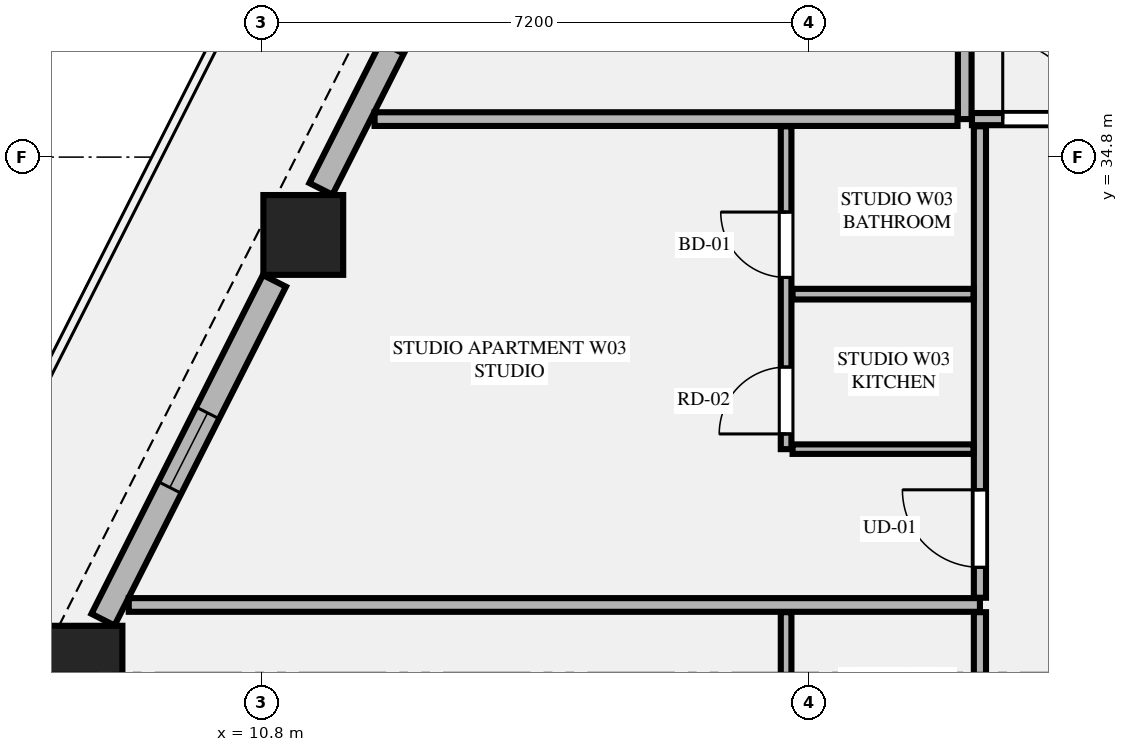
"""IFC4 building model, lengths in metres.
Left out: names, types, materials, properties, quantities, classifications, styles, units other than length and angle.
Written with IfcOpenShell. Run it as: python <this file> out.ifc"""

import sys

from ifc_helpers import new_model, si_unit, direction, frame, frame_2d, origin, origin_2d, place, context, subcontext, project, spatial, rectangle, extrude, element, fill, save


model = new_model("IFC4")
c1 = context("Model", 3, precision=1e-05, world=origin(), true_north=direction((0.0, 1.0)))
c2 = subcontext(c1, "Body", "Model", "MODEL_VIEW")
j1 = project(units=[si_unit("LENGTHUNIT", "METRE"), si_unit("PLANEANGLEUNIT", "RADIAN")], contexts=[c1])
p1 = place(None, origin())
s1 = spatial("IfcSite", under=j1, at=p1, CompositionType="ELEMENT")
p2 = place(p1, origin())
s2 = spatial("IfcBuilding", under=s1, at=p2, CompositionType="ELEMENT")
p3 = place(p2, frame((0.0, 0.0, 98.4)))
s3 = spatial("IfcBuildingStorey", under=s2, at=p3, CompositionType="ELEMENT", Elevation=98.4)
for number, where, z_axis, x_axis in (
    (1, (11.348, 33.776, 0.0), (0.0, 0.0, 1.0), (1.0, 0.0, 0.0)),
    (2, (8.443, 28.109, 0.0), (0.0, 0.0, 1.0), (1.0, 0.0, 0.0)),
):
    element("IfcColumn", number, at=place(p3, frame(where, z_axis=z_axis, x_axis=x_axis)), inside=s3, PredefinedType="COLUMN", context=c2, shape_type="SweptSolid", body=[
        extrude(rectangle(XDim=1.05, YDim=1.05, at=origin_2d()), origin(), (0.0, 0.0, 1.0), 3.55),
    ])
p4 = place(p3, frame((13.937, 39.039, 0.0), z_axis=(0.0, 0.0, 1.0), x_axis=(-0.451567731634, -0.892236842855, 0.0)))
e3 = element("IfcWall", 3, at=p4, inside=s3, PredefinedType="STANDARD", context=c2, shape_type="SweptSolid", body=[
    extrude(rectangle(XDim=5.219, YDim=0.34, at=frame_2d((2.61, 0.0))), origin(), (0.0, 0.0, 1.0), 2.797),
])
p5 = place(p4, frame((2.06, 0.0, 0.75)))
e4 = element("IfcOpeningElement", 4, at=p5, cuts=e3, PredefinedType="OPENING", context=c2, shape_type="SweptSolid", body=[
    extrude(rectangle(XDim=1.1, YDim=1.897, at=frame_2d((0.55, 0.948))), frame((0.0, 0.18, 0.0), z_axis=(0.0, -1.0, 0.0), x_axis=(1.0, 0.0, 0.0)), (0.0, 0.0, 1.0), 0.36),
])
p6 = place(p3, frame((10.968, 33.172, 0.0), z_axis=(0.0, 0.0, 1.0), x_axis=(-0.451470533039, -0.892286029139, 0.0)))
e5 = element("IfcWall", 5, at=p6, inside=s3, PredefinedType="STANDARD", context=c2, shape_type="SweptSolid", body=[
    extrude(rectangle(XDim=4.995, YDim=0.34, at=frame_2d((2.498, 0.0))), origin(), (0.0, 0.0, 1.0), 2.797),
])
p7 = place(p6, frame((1.947, 0.0, 0.75)))
e6 = element("IfcOpeningElement", 6, at=p7, cuts=e5, PredefinedType="OPENING", context=c2, shape_type="SweptSolid", body=[
    extrude(rectangle(XDim=1.1, YDim=1.897, at=frame_2d((0.55, 0.948))), frame((0.0, 0.18, 0.0), z_axis=(0.0, -1.0, 0.0), x_axis=(1.0, 0.0, 0.0)), (0.0, 0.0, 1.0), 0.36),
])
p8 = place(p3, frame((20.05, 35.3, 0.0), z_axis=(0.0, 0.0, 1.0), x_axis=(0.0, 1.0, 0.0)))
e7 = element("IfcWall", 7, at=p8, inside=s3, PredefinedType="PARTITIONING", context=c2, shape_type="SweptSolid", body=[
    extrude(rectangle(XDim=12.195, YDim=0.18, at=frame_2d((6.098, 0.0))), origin(), (0.0, 0.0, 1.0), 3.34),
])
p9 = place(p3, frame((20.145, 35.3, 0.0), z_axis=(0.0, 0.0, 1.0), x_axis=(1.0, 0.0, 0.0)))
e8 = element("IfcWall", 8, at=p9, inside=s3, PredefinedType="PARTITIONING", context=c2, shape_type="SweptSolid", body=[
    extrude(rectangle(XDim=15.992, YDim=0.16, at=frame_2d((7.996, 0.0))), origin(), (0.0, 0.0, 1.0), 3.34),
])
p10 = place(p9, frame((0.405, 0.0, 0.0)))
e9 = element("IfcOpeningElement", 9, at=p10, cuts=e8, PredefinedType="OPENING", context=c2, shape_type="SweptSolid", body=[
    extrude(rectangle(XDim=1.02, YDim=2.25, at=frame_2d((0.51, 1.125))), frame((0.0, 0.09, 0.0), z_axis=(0.0, -1.0, 0.0), x_axis=(1.0, 0.0, 0.0)), (0.0, 0.0, 1.0), 0.18),
])
p11 = place(p3, frame((12.286, 35.3, 0.0), z_axis=(0.0, 0.0, 1.0), x_axis=(1.0, 0.0, 0.0)))
e10 = element("IfcWall", 10, at=p11, inside=s3, PredefinedType="PARTITIONING", context=c2, shape_type="SweptSolid", body=[
    extrude(rectangle(XDim=7.669, YDim=0.18, at=frame_2d((3.834, 0.0))), origin(), (0.0, 0.0, 1.0), 3.34),
])
p12 = place(p3, frame((20.25, 22.799, 0.0), z_axis=(0.0, 0.0, 1.0), x_axis=(0.0, 1.0, 0.0)))
e11 = element("IfcWall", 11, at=p12, inside=s3, PredefinedType="PARTITIONING", context=c2, shape_type="SweptSolid", body=[
    extrude(rectangle(XDim=6.014, YDim=0.16, at=frame_2d((3.007, 0.0))), origin(), (0.0, 0.0, 1.0), 3.34),
])
p13 = place(p12, frame((0.4, 0.0, 0.0)))
e12 = element("IfcOpeningElement", 12, at=p13, cuts=e11, PredefinedType="OPENING", context=c2, shape_type="SweptSolid", body=[
    extrude(rectangle(XDim=1.02, YDim=2.25, at=frame_2d((0.51, 1.125))), frame((0.0, 0.09, 0.0), z_axis=(0.0, -1.0, 0.0), x_axis=(1.0, 0.0, 0.0)), (0.0, 0.0, 1.0), 0.18),
])
p14 = place(p3, frame((17.7, 24.754, 0.0), z_axis=(0.0, 0.0, 1.0), x_axis=(0.0, 1.0, 0.0)))
e13 = element("IfcWall", 13, at=p14, inside=s3, PredefinedType="PLUMBINGWALL", context=c2, shape_type="SweptSolid", body=[
    extrude(rectangle(XDim=4.059, YDim=0.14, at=frame_2d((2.03, 0.0))), origin(), (0.0, 0.0, 1.0), 3.34),
])
p15 = place(p14, frame((2.168, 0.0, 0.0)))
e14 = element("IfcOpeningElement", 14, at=p15, cuts=e13, PredefinedType="OPENING", context=c2, shape_type="SweptSolid", body=[
    extrude(rectangle(XDim=0.86, YDim=2.1, at=frame_2d((0.43, 1.05))), frame((0.0, 0.08, 0.0), z_axis=(0.0, -1.0, 0.0), x_axis=(1.0, 0.0, 0.0)), (0.0, 0.0, 1.0), 0.16),
])
p16 = place(p14, frame((0.2, 0.0, 0.0)))
e15 = element("IfcOpeningElement", 15, at=p16, cuts=e13, PredefinedType="OPENING", context=c2, shape_type="SweptSolid", body=[
    extrude(rectangle(XDim=0.88, YDim=2.15, at=frame_2d((0.44, 1.075))), frame((0.0, 0.08, 0.0), z_axis=(0.0, -1.0, 0.0), x_axis=(1.0, 0.0, 0.0)), (0.0, 0.0, 1.0), 0.16),
])
p17 = place(p3, frame((9.052, 28.908, 0.0), z_axis=(0.0, 0.0, 1.0), x_axis=(1.0, 0.0, 0.0)))
e16 = element("IfcWall", 16, at=p17, inside=s3, PredefinedType="PARTITIONING", context=c2, shape_type="SweptSolid", body=[
    extrude(rectangle(XDim=11.198, YDim=0.18, at=frame_2d((5.599, 0.0))), origin(), (0.0, 0.0, 1.0), 3.34),
])
p18 = place(p3, frame((20.25, 29.003, 0.0), z_axis=(0.0, 0.0, 1.0), x_axis=(0.0, 1.0, 0.0)))
e17 = element("IfcWall", 17, at=p18, inside=s3, PredefinedType="PARTITIONING", context=c2, shape_type="SweptSolid", body=[
    extrude(rectangle(XDim=6.202, YDim=0.16, at=frame_2d((3.101, 0.0))), origin(), (0.0, 0.0, 1.0), 3.34),
])
p19 = place(p18, frame((0.4, 0.0, 0.0)))
e18 = element("IfcOpeningElement", 18, at=p19, cuts=e17, PredefinedType="OPENING", context=c2, shape_type="SweptSolid", body=[
    extrude(rectangle(XDim=1.02, YDim=2.25, at=frame_2d((0.51, 1.125))), frame((0.0, 0.09, 0.0), z_axis=(0.0, -1.0, 0.0), x_axis=(1.0, 0.0, 0.0)), (0.0, 0.0, 1.0), 0.18),
])
p20 = place(p3, frame((17.785, 30.958, 0.0), z_axis=(0.0, 0.0, 1.0), x_axis=(1.0, 0.0, 0.0)))
e19 = element("IfcWall", 19, at=p20, inside=s3, PredefinedType="PARTITIONING", context=c2, shape_type="SweptSolid", body=[
    extrude(rectangle(XDim=2.38, YDim=0.125, at=frame_2d((1.19, 0.0))), origin(), (0.0, 0.0, 1.0), 3.34),
])
p21 = place(p3, frame((17.7, 30.958, 0.0), z_axis=(0.0, 0.0, 1.0), x_axis=(0.0, 1.0, 0.0)))
e20 = element("IfcWall", 20, at=p21, inside=s3, PredefinedType="PLUMBINGWALL", context=c2, shape_type="SweptSolid", body=[
    extrude(rectangle(XDim=4.247, YDim=0.14, at=frame_2d((2.124, 0.0))), origin(), (0.0, 0.0, 1.0), 3.34),
])
p22 = place(p21, frame((2.259, 0.0, 0.0)))
e21 = element("IfcOpeningElement", 21, at=p22, cuts=e20, PredefinedType="OPENING", context=c2, shape_type="SweptSolid", body=[
    extrude(rectangle(XDim=0.86, YDim=2.1, at=frame_2d((0.43, 1.05))), frame((0.0, 0.08, 0.0), z_axis=(0.0, -1.0, 0.0), x_axis=(1.0, 0.0, 0.0)), (0.0, 0.0, 1.0), 0.16),
])
p23 = place(p21, frame((0.2, 0.0, 0.0)))
e22 = element("IfcOpeningElement", 22, at=p23, cuts=e20, PredefinedType="OPENING", context=c2, shape_type="SweptSolid", body=[
    extrude(rectangle(XDim=0.88, YDim=2.15, at=frame_2d((0.44, 1.075))), frame((0.0, 0.08, 0.0), z_axis=(0.0, -1.0, 0.0), x_axis=(1.0, 0.0, 0.0)), (0.0, 0.0, 1.0), 0.16),
])
p24 = place(p3, frame((17.785, 32.997, 0.0), z_axis=(0.0, 0.0, 1.0), x_axis=(1.0, 0.0, 0.0)))
e23 = element("IfcWall", 23, at=p24, inside=s3, PredefinedType="PLUMBINGWALL", context=c2, shape_type="SweptSolid", body=[
    extrude(rectangle(XDim=2.38, YDim=0.14, at=frame_2d((1.19, 0.0))), origin(), (0.0, 0.0, 1.0), 3.34),
])
p25 = place(p7, origin())
e24 = element("IfcWindow", 24, at=p25, inside=s3, PartitioningType="SINGLE_PANEL", PredefinedType="WINDOW", context=c2, shape_type="SweptSolid", body=[
    extrude(rectangle(XDim=1.1, YDim=1.897, at=frame_2d((0.55, 0.948))), frame((0.0, 0.03, 0.0), z_axis=(0.0, -1.0, 0.0), x_axis=(1.0, 0.0, 0.0)), (0.0, 0.0, 1.0), 0.06),
])
fill(e6, e24)
p26 = place(p10, origin())
e25 = element("IfcDoor", 25, at=p26, inside=s3, OperationType="SINGLE_SWING_LEFT", PredefinedType="DOOR", context=c2, shape_type="SweptSolid", body=[
    extrude(rectangle(XDim=1.02, YDim=2.25, at=frame_2d((0.51, 1.125))), frame((0.0, 0.025, 0.0), z_axis=(0.0, -1.0, 0.0), x_axis=(1.0, 0.0, 0.0)), (0.0, 0.0, 1.0), 0.05),
])
fill(e9, e25)
p27 = place(p22, origin())
e26 = element("IfcDoor", 26, at=p27, inside=s3, OperationType="SINGLE_SWING_RIGHT", PredefinedType="DOOR", context=c2, shape_type="SweptSolid", body=[
    extrude(rectangle(XDim=0.86, YDim=2.1, at=frame_2d((0.43, 1.05))), frame((0.0, 0.025, 0.0), z_axis=(0.0, -1.0, 0.0), x_axis=(1.0, 0.0, 0.0)), (0.0, 0.0, 1.0), 0.05),
])
fill(e21, e26)
p28 = place(p19, origin())
e27 = element("IfcDoor", 27, at=p28, inside=s3, OperationType="SINGLE_SWING_RIGHT", PredefinedType="DOOR", context=c2, shape_type="SweptSolid", body=[
    extrude(rectangle(XDim=1.02, YDim=2.25, at=frame_2d((0.51, 1.125))), frame((0.0, 0.025, 0.0), z_axis=(0.0, -1.0, 0.0), x_axis=(1.0, 0.0, 0.0)), (0.0, 0.0, 1.0), 0.05),
])
fill(e18, e27)
p29 = place(p23, origin())
e28 = element("IfcDoor", 28, at=p29, inside=s3, OperationType="SINGLE_SWING_LEFT", PredefinedType="DOOR", context=c2, shape_type="SweptSolid", body=[
    extrude(rectangle(XDim=0.88, YDim=2.15, at=frame_2d((0.44, 1.075))), frame((0.0, 0.025, 0.0), z_axis=(0.0, -1.0, 0.0), x_axis=(1.0, 0.0, 0.0)), (0.0, 0.0, 1.0), 0.05),
])
fill(e22, e28)
save(model, sys.argv[1])
